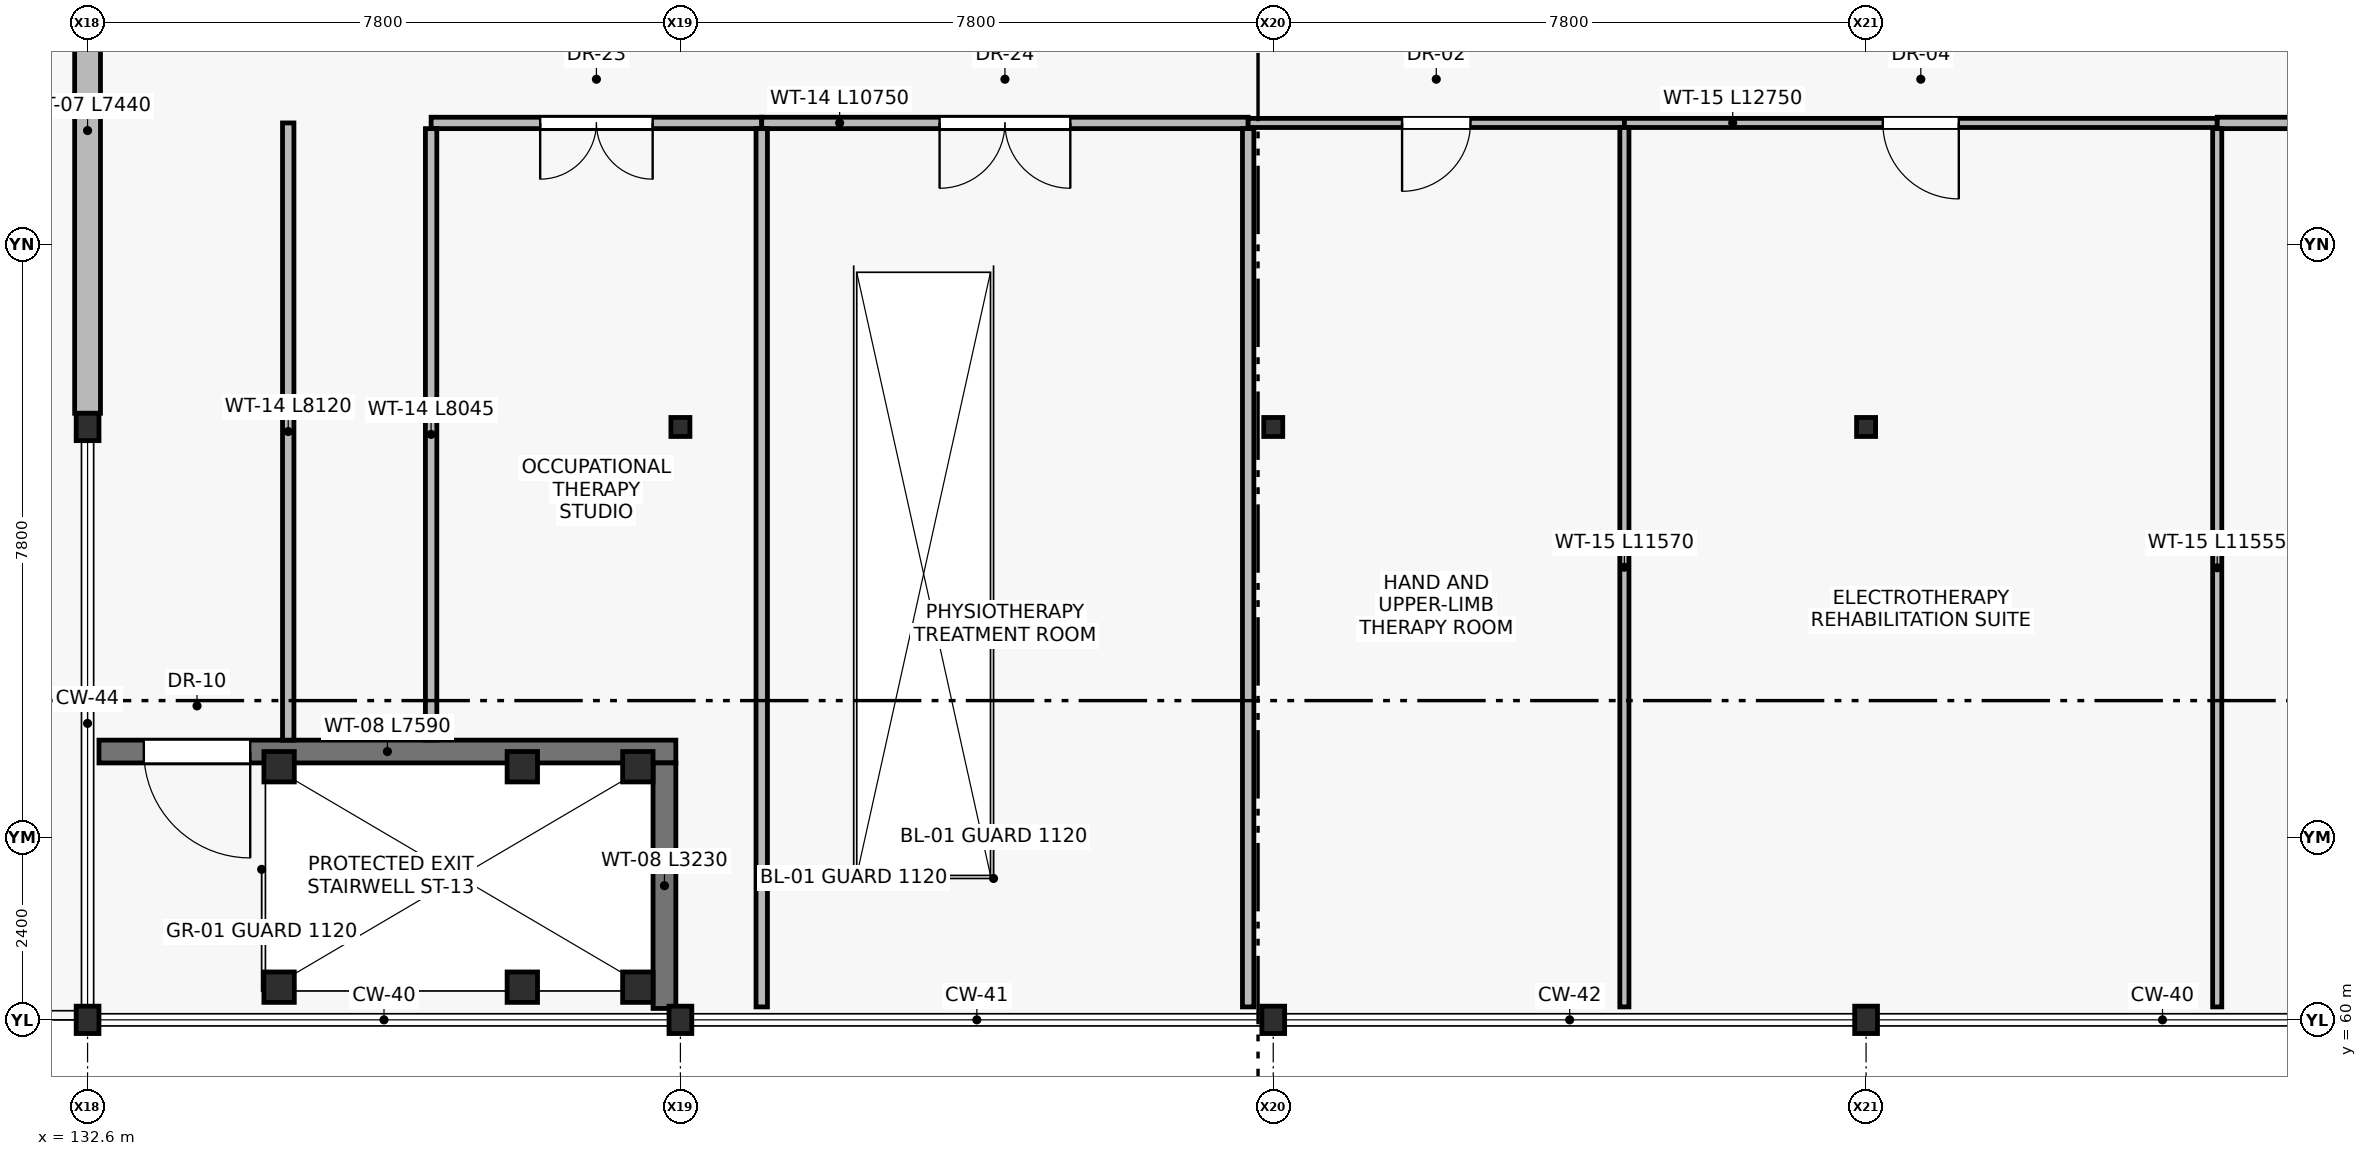
"""IFC4 building model, lengths in metres.
Left out: names, types, materials, properties, quantities, classifications, styles, units other than length and angle.
Written with IfcOpenShell. Run it as: python <this file> out.ifc"""

import sys

from ifc_helpers import new_model, si_unit, direction, frame, frame_2d, origin, origin_2d, place, context, subcontext, project, spatial, rectangle, hollow_rectangle, i_section, extrude, element, fill, save


model = new_model("IFC4")
c1 = context("Model", 3, precision=1e-05, world=origin(), true_north=direction((0.0, 1.0)))
c2 = subcontext(c1, "Body", "Model", "MODEL_VIEW")
j1 = project(units=[si_unit("LENGTHUNIT", "METRE"), si_unit("PLANEANGLEUNIT", "RADIAN")], contexts=[c1])
p1 = place(None, origin())
s1 = spatial("IfcSite", under=j1, at=p1, CompositionType="ELEMENT")
p2 = place(p1, origin())
s2 = spatial("IfcBuilding", under=s1, at=p2, CompositionType="ELEMENT")
p3 = place(p2, frame((0.0, 0.0, 4.8)))
s3 = spatial("IfcBuildingStorey", under=s2, at=p3, CompositionType="ELEMENT", Elevation=4.8)
for number, where, z_axis, x_axis in (
    (1, (132.6, 60.0, 0.0), (0.0, 0.0, 1.0), (1.0, 0.0, 0.0)),
    (2, (132.6, 67.8, 0.0), (0.0, 0.0, 1.0), (1.0, 0.0, 0.0)),
    (3, (140.4, 60.0, 0.0), (0.0, 0.0, 1.0), (1.0, 0.0, 0.0)),
):
    element("IfcColumn", number, at=place(p3, frame(where, z_axis=z_axis, x_axis=x_axis)), inside=s3, PredefinedType="COLUMN", context=c2, shape_type="SweptSolid", body=[
        extrude(i_section(OverallWidth=0.3, OverallDepth=0.36, WebThickness=0.012, FlangeThickness=0.022, at=origin_2d()), origin(), (0.0, 0.0, 1.0), 4.8),
    ])
p4 = place(p3, frame((140.4, 67.8, 0.0), z_axis=(0.0, 0.0, 1.0), x_axis=(1.0, 0.0, 0.0)))
e4 = element("IfcColumn", 4, at=p4, inside=s3, PredefinedType="COLUMN", context=c2, shape_type="SweptSolid", body=[
    extrude(hollow_rectangle(XDim=0.25, YDim=0.25, WallThickness=0.012, at=origin_2d()), origin(), (0.0, 0.0, 1.0), 4.8),
])
p5 = place(p3, frame((148.2, 60.0, 0.0), z_axis=(0.0, 0.0, 1.0), x_axis=(1.0, 0.0, 0.0)))
e5 = element("IfcColumn", 5, at=p5, inside=s3, PredefinedType="COLUMN", context=c2, shape_type="SweptSolid", body=[
    extrude(i_section(OverallWidth=0.3, OverallDepth=0.36, WebThickness=0.012, FlangeThickness=0.022, at=origin_2d()), origin(), (0.0, 0.0, 1.0), 4.8),
])
p6 = place(p3, frame((148.2, 67.8, 0.0), z_axis=(0.0, 0.0, 1.0), x_axis=(1.0, 0.0, 0.0)))
e6 = element("IfcColumn", 6, at=p6, inside=s3, PredefinedType="COLUMN", context=c2, shape_type="SweptSolid", body=[
    extrude(hollow_rectangle(XDim=0.25, YDim=0.25, WallThickness=0.012, at=origin_2d()), origin(), (0.0, 0.0, 1.0), 4.8),
])
p7 = place(p3, frame((156.0, 60.0, 0.0), z_axis=(0.0, 0.0, 1.0), x_axis=(1.0, 0.0, 0.0)))
e7 = element("IfcColumn", 7, at=p7, inside=s3, PredefinedType="COLUMN", context=c2, shape_type="SweptSolid", body=[
    extrude(i_section(OverallWidth=0.3, OverallDepth=0.36, WebThickness=0.012, FlangeThickness=0.022, at=origin_2d()), origin(), (0.0, 0.0, 1.0), 4.8),
])
p8 = place(p3, frame((156.0, 67.8, 0.0), z_axis=(0.0, 0.0, 1.0), x_axis=(1.0, 0.0, 0.0)))
e8 = element("IfcColumn", 8, at=p8, inside=s3, PredefinedType="COLUMN", context=c2, shape_type="SweptSolid", body=[
    extrude(hollow_rectangle(XDim=0.25, YDim=0.25, WallThickness=0.012, at=origin_2d()), origin(), (0.0, 0.0, 1.0), 4.8),
])
for number, where, z_axis, x_axis in (
    (9, (135.12, 60.43, 0.0), (0.0, 0.0, 1.0), (1.0, 0.0, 0.0)),
    (10, (135.12, 63.33, 0.0), (0.0, 0.0, 1.0), (1.0, 0.0, 0.0)),
    (11, (138.32, 60.43, 0.0), (0.0, 0.0, 1.0), (1.0, 0.0, 0.0)),
    (12, (138.32, 63.33, 0.0), (0.0, 0.0, 1.0), (1.0, 0.0, 0.0)),
    (13, (139.84, 60.43, 0.0), (0.0, 0.0, 1.0), (1.0, 0.0, 0.0)),
    (14, (139.84, 63.33, 0.0), (0.0, 0.0, 1.0), (1.0, 0.0, 0.0)),
):
    element("IfcColumn", number, at=place(p3, frame(where, z_axis=z_axis, x_axis=x_axis)), inside=s3, PredefinedType="COLUMN", context=c2, shape_type="SweptSolid", body=[
        extrude(rectangle(XDim=0.4, YDim=0.4, at=origin_2d()), origin(), (0.0, 0.0, 1.0), 4.8),
    ])
p9 = place(p3, frame((132.6, 67.98, 0.0), z_axis=(0.0, 0.0, 1.0), x_axis=(0.0, 1.0, 0.0)))
e15 = element("IfcWall", 15, at=p9, inside=s3, PredefinedType="STANDARD", context=c2, shape_type="SweptSolid", body=[
    extrude(rectangle(XDim=7.44, YDim=0.34, at=frame_2d((3.72, 0.0))), origin(), (0.0, 0.0, 1.0), 4.75),
])
p10 = place(p9, frame((4.795, 0.0, 0.0)))
e16 = element("IfcOpeningElement", 16, at=p10, cuts=e15, PredefinedType="OPENING", context=c2, shape_type="SweptSolid", body=[
    extrude(rectangle(XDim=1.25, YDim=2.2, at=frame_2d((0.625, 1.1))), frame((0.0, 0.18, 0.0), z_axis=(0.0, -1.0, 0.0), x_axis=(1.0, 0.0, 0.0)), (0.0, 0.0, 1.0), 0.36),
])
p11 = place(p3, frame((140.34, 63.53, 0.0), z_axis=(0.0, 0.0, 1.0), x_axis=(-1.0, 0.0, 0.0)))
e17 = element("IfcWall", 17, at=p11, inside=s3, PredefinedType="SHEAR", context=c2, shape_type="SweptSolid", body=[
    extrude(rectangle(XDim=7.59, YDim=0.3, at=frame_2d((3.795, 0.0))), origin(), (0.0, 0.0, 1.0), 4.54),
])
p12 = place(p11, frame((5.6, 0.0, 0.0)))
e18 = element("IfcOpeningElement", 18, at=p12, cuts=e17, PredefinedType="OPENING", context=c2, shape_type="SweptSolid", body=[
    extrude(rectangle(XDim=1.4, YDim=2.2, at=frame_2d((0.7, 1.1))), frame((0.0, 0.16, 0.0), z_axis=(0.0, -1.0, 0.0), x_axis=(1.0, 0.0, 0.0)), (0.0, 0.0, 1.0), 0.32),
])
p13 = place(p3, frame((140.19, 60.15, 0.0), z_axis=(0.0, 0.0, 1.0), x_axis=(0.0, 1.0, 0.0)))
e19 = element("IfcWall", 19, at=p13, inside=s3, PredefinedType="SHEAR", context=c2, shape_type="SweptSolid", body=[
    extrude(rectangle(XDim=3.23, YDim=0.3, at=frame_2d((1.615, 0.0))), origin(), (0.0, 0.0, 1.0), 4.54),
])
p14 = place(p3, frame((135.24, 63.68, 0.0), z_axis=(0.0, 0.0, 1.0), x_axis=(0.0, 1.0, 0.0)))
e20 = element("IfcWall", 20, at=p14, inside=s3, PredefinedType="PARTITIONING", context=c2, shape_type="SweptSolid", body=[
    extrude(rectangle(XDim=8.12, YDim=0.15, at=frame_2d((4.06, 0.0))), origin(), (0.0, 0.0, 1.0), 4.54),
])
p15 = place(p3, frame((141.47, 71.8, 0.0), z_axis=(0.0, 0.0, 1.0), x_axis=(-1.0, 0.0, 0.0)))
e21 = element("IfcWall", 21, at=p15, inside=s3, PredefinedType="PARTITIONING", context=c2, shape_type="SweptSolid", body=[
    extrude(rectangle(XDim=4.35, YDim=0.15, at=frame_2d((2.175, 0.0))), origin(), (0.0, 0.0, 1.0), 4.54),
])
p16 = place(p15, frame((1.435, 0.0, 0.0)))
e22 = element("IfcOpeningElement", 22, at=p16, cuts=e21, PredefinedType="OPENING", context=c2, shape_type="SweptSolid", body=[
    extrude(rectangle(XDim=1.48, YDim=2.25, at=frame_2d((0.74, 1.125))), frame((0.0, 0.085, 0.0), z_axis=(0.0, -1.0, 0.0), x_axis=(1.0, 0.0, 0.0)), (0.0, 0.0, 1.0), 0.17),
])
p17 = place(p3, frame((147.87, 71.8, 0.0), z_axis=(0.0, 0.0, 1.0), x_axis=(-1.0, 0.0, 0.0)))
e23 = element("IfcWall", 23, at=p17, inside=s3, PredefinedType="PARTITIONING", context=c2, shape_type="SweptSolid", body=[
    extrude(rectangle(XDim=6.4, YDim=0.15, at=frame_2d((3.2, 0.0))), origin(), (0.0, 0.0, 1.0), 4.54),
])
p18 = place(p17, frame((2.34, 0.0, 0.0)))
e24 = element("IfcOpeningElement", 24, at=p18, cuts=e23, PredefinedType="OPENING", context=c2, shape_type="SweptSolid", body=[
    extrude(rectangle(XDim=1.72, YDim=2.3, at=frame_2d((0.86, 1.15))), frame((0.0, 0.085, 0.0), z_axis=(0.0, -1.0, 0.0), x_axis=(1.0, 0.0, 0.0)), (0.0, 0.0, 1.0), 0.17),
])
p19 = place(p3, frame((152.82, 71.8, 0.0), z_axis=(0.0, 0.0, 1.0), x_axis=(-1.0, 0.0, 0.0)))
e25 = element("IfcWall", 25, at=p19, inside=s3, PredefinedType="PARTITIONING", context=c2, shape_type="SweptSolid", body=[
    extrude(rectangle(XDim=4.95, YDim=0.12, at=frame_2d((2.475, 0.0))), origin(), (0.0, 0.0, 1.0), 4.54),
])
p20 = place(p19, frame((2.025, 0.0, 0.0)))
e26 = element("IfcOpeningElement", 26, at=p20, cuts=e25, PredefinedType="OPENING", context=c2, shape_type="SweptSolid", body=[
    extrude(rectangle(XDim=0.9, YDim=2.1, at=frame_2d((0.45, 1.05))), frame((0.0, 0.07, 0.0), z_axis=(0.0, -1.0, 0.0), x_axis=(1.0, 0.0, 0.0)), (0.0, 0.0, 1.0), 0.14),
])
p21 = place(p3, frame((160.62, 71.8, 0.0), z_axis=(0.0, 0.0, 1.0), x_axis=(-1.0, 0.0, 0.0)))
e27 = element("IfcWall", 27, at=p21, inside=s3, PredefinedType="PARTITIONING", context=c2, shape_type="SweptSolid", body=[
    extrude(rectangle(XDim=7.8, YDim=0.12, at=frame_2d((3.9, 0.0))), origin(), (0.0, 0.0, 1.0), 4.54),
])
p22 = place(p21, frame((3.4, 0.0, 0.0)))
e28 = element("IfcOpeningElement", 28, at=p22, cuts=e27, PredefinedType="OPENING", context=c2, shape_type="SweptSolid", body=[
    extrude(rectangle(XDim=1.0, YDim=2.1, at=frame_2d((0.5, 1.05))), frame((0.0, 0.07, 0.0), z_axis=(0.0, -1.0, 0.0), x_axis=(1.0, 0.0, 0.0)), (0.0, 0.0, 1.0), 0.14),
])
p23 = place(p3, frame((167.83, 71.8, 0.0), z_axis=(0.0, 0.0, 1.0), x_axis=(-1.0, 0.0, 0.0)))
e29 = element("IfcWall", 29, at=p23, inside=s3, PredefinedType="PARTITIONING", context=c2, shape_type="SweptSolid", body=[
    extrude(rectangle(XDim=7.21, YDim=0.15, at=frame_2d((3.605, 0.0))), origin(), (0.0, 0.0, 1.0), 4.54),
])
p24 = place(p23, frame((3.08, 0.0, 0.0)))
e30 = element("IfcOpeningElement", 30, at=p24, cuts=e29, PredefinedType="OPENING", context=c2, shape_type="SweptSolid", body=[
    extrude(rectangle(XDim=1.05, YDim=2.15, at=frame_2d((0.525, 1.075))), frame((0.0, 0.085, 0.0), z_axis=(0.0, -1.0, 0.0), x_axis=(1.0, 0.0, 0.0)), (0.0, 0.0, 1.0), 0.17),
])
p25 = place(p3, frame((137.12, 63.68, 0.0), z_axis=(0.0, 0.0, 1.0), x_axis=(0.0, 1.0, 0.0)))
e31 = element("IfcWall", 31, at=p25, inside=s3, PredefinedType="PARTITIONING", context=c2, shape_type="SweptSolid", body=[
    extrude(rectangle(XDim=8.045, YDim=0.15, at=frame_2d((4.022, 0.0))), origin(), (0.0, 0.0, 1.0), 4.54),
])
for number, where, z_axis, x_axis in (
    (32, (141.47, 60.17, 0.0), (0.0, 0.0, 1.0), (0.0, 1.0, 0.0)),
    (33, (147.87, 60.17, 0.0), (0.0, 0.0, 1.0), (0.0, 1.0, 0.0)),
):
    element("IfcWall", number, at=place(p3, frame(where, z_axis=z_axis, x_axis=x_axis)), inside=s3, PredefinedType="PARTITIONING", context=c2, shape_type="SweptSolid", body=[
        extrude(rectangle(XDim=11.555, YDim=0.15, at=frame_2d((5.778, 0.0))), origin(), (0.0, 0.0, 1.0), 4.54),
    ])
p26 = place(p3, frame((152.82, 60.17, 0.0), z_axis=(0.0, 0.0, 1.0), x_axis=(0.0, 1.0, 0.0)))
e34 = element("IfcWall", 34, at=p26, inside=s3, PredefinedType="PARTITIONING", context=c2, shape_type="SweptSolid", body=[
    extrude(rectangle(XDim=11.57, YDim=0.12, at=frame_2d((5.785, 0.0))), origin(), (0.0, 0.0, 1.0), 4.54),
])
p27 = place(p3, frame((160.62, 60.17, 0.0), z_axis=(0.0, 0.0, 1.0), x_axis=(0.0, 1.0, 0.0)))
e35 = element("IfcWall", 35, at=p27, inside=s3, PredefinedType="PARTITIONING", context=c2, shape_type="SweptSolid", body=[
    extrude(rectangle(XDim=11.555, YDim=0.12, at=frame_2d((5.778, 0.0))), origin(), (0.0, 0.0, 1.0), 4.54),
])
p28 = place(p12, origin())
e36 = element("IfcDoor", 36, at=p28, inside=s3, OperationType="SINGLE_SWING_LEFT", PredefinedType="DOOR", context=c2, shape_type="SweptSolid", body=[
    extrude(rectangle(XDim=1.4, YDim=2.2, at=frame_2d((0.7, 1.1))), frame((0.0, 0.025, 0.0), z_axis=(0.0, -1.0, 0.0), x_axis=(1.0, 0.0, 0.0)), (0.0, 0.0, 1.0), 0.05),
])
fill(e18, e36)
p29 = place(p16, origin())
e37 = element("IfcDoor", 37, at=p29, inside=s3, OperationType="DOUBLE_DOOR_SINGLE_SWING", PredefinedType="DOOR", context=c2, shape_type="SweptSolid", body=[
    extrude(rectangle(XDim=1.48, YDim=2.25, at=frame_2d((0.74, 1.125))), frame((0.0, 0.025, 0.0), z_axis=(0.0, -1.0, 0.0), x_axis=(1.0, 0.0, 0.0)), (0.0, 0.0, 1.0), 0.05),
])
fill(e22, e37)
p30 = place(p18, origin())
e38 = element("IfcDoor", 38, at=p30, inside=s3, OperationType="DOUBLE_DOOR_SINGLE_SWING", PredefinedType="DOOR", context=c2, shape_type="SweptSolid", body=[
    extrude(rectangle(XDim=1.72, YDim=2.3, at=frame_2d((0.86, 1.15))), frame((0.0, 0.025, 0.0), z_axis=(0.0, -1.0, 0.0), x_axis=(1.0, 0.0, 0.0)), (0.0, 0.0, 1.0), 0.05),
])
fill(e24, e38)
p31 = place(p20, origin())
e39 = element("IfcDoor", 39, at=p31, inside=s3, OperationType="SINGLE_SWING_RIGHT", PredefinedType="DOOR", context=c2, shape_type="SweptSolid", body=[
    extrude(rectangle(XDim=0.9, YDim=2.1, at=frame_2d((0.45, 1.05))), frame((0.0, 0.025, 0.0), z_axis=(0.0, -1.0, 0.0), x_axis=(1.0, 0.0, 0.0)), (0.0, 0.0, 1.0), 0.05),
])
fill(e26, e39)
p32 = place(p22, origin())
e40 = element("IfcDoor", 40, at=p32, inside=s3, OperationType="SINGLE_SWING_LEFT", PredefinedType="DOOR", context=c2, shape_type="SweptSolid", body=[
    extrude(rectangle(XDim=1.0, YDim=2.1, at=frame_2d((0.5, 1.05))), frame((0.0, 0.025, 0.0), z_axis=(0.0, -1.0, 0.0), x_axis=(1.0, 0.0, 0.0)), (0.0, 0.0, 1.0), 0.05),
])
fill(e28, e40)
save(model, sys.argv[1])
